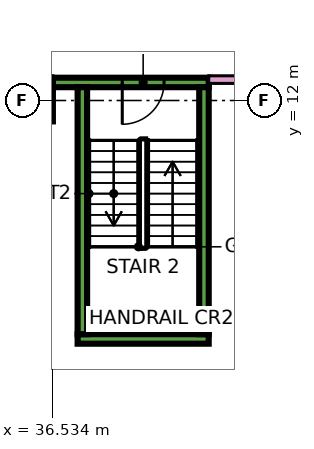
"""IFC4 building model, lengths in metres.
Left out: names, types, materials, properties, quantities, classifications, styles, units other than length and angle.
Written with IfcOpenShell. Run it as: python <this file> out.ifc"""

import sys

from ifc_helpers import new_model, si_unit, direction, frame, frame_2d, origin, origin_2d, place, context, subcontext, project, spatial, rectangle, extrude, element, fill, save


model = new_model("IFC4")
c1 = context("Model", 3, precision=1e-05, world=origin(), true_north=direction((0.0, 1.0)))
c2 = subcontext(c1, "Body", "Model", "MODEL_VIEW")
j1 = project(units=[si_unit("LENGTHUNIT", "METRE"), si_unit("PLANEANGLEUNIT", "RADIAN")], contexts=[c1])
p1 = place(None, origin())
s1 = spatial("IfcSite", under=j1, at=p1, CompositionType="ELEMENT")
p2 = place(p1, origin())
s2 = spatial("IfcBuilding", under=s1, at=p2, CompositionType="ELEMENT")
p3 = place(p2, frame((0.0, 0.0, 52.65)))
s3 = spatial("IfcBuildingStorey", under=s2, at=p3, CompositionType="ELEMENT", Elevation=52.65)
p4 = place(p3, frame((36.0, 12.0, 0.0), z_axis=(0.0, 0.0, 1.0), x_axis=(1.0, 0.0, 0.0)))
e1 = element("IfcColumn", 1, at=p4, inside=s3, PredefinedType="COLUMN", context=c2, shape_type="SweptSolid", body=[
    extrude(rectangle(XDim=1.1, YDim=1.1, at=origin_2d()), origin(), (0.0, 0.0, 1.0), 3.75),
])
p5 = place(p3, frame((37.2, 5.725, 0.0), z_axis=(0.0, 0.0, 1.0), x_axis=(1.0, 0.0, 0.0)))
e2 = element("IfcWall", 2, at=p5, inside=s3, PredefinedType="SHEAR", context=c2, shape_type="SweptSolid", body=[
    extrude(rectangle(XDim=3.45, YDim=0.25, at=frame_2d((1.725, 0.0))), origin(), (0.0, 0.0, 1.0), 3.75),
])
p6 = place(p3, frame((36.55, 12.475, 0.0), z_axis=(0.0, 0.0, 1.0), x_axis=(1.0, 0.0, 0.0)))
e3 = element("IfcWall", 3, at=p6, inside=s3, PredefinedType="SHEAR", context=c2, shape_type="SweptSolid", body=[
    extrude(rectangle(XDim=4.1, YDim=0.25, at=frame_2d((2.05, 0.0))), origin(), (0.0, 0.0, 1.0), 3.75),
])
p7 = place(p6, frame((1.825, 0.0, 0.0)))
e4 = element("IfcOpeningElement", 4, at=p7, cuts=e3, PredefinedType="OPENING", context=c2, shape_type="SweptSolid", body=[
    extrude(rectangle(XDim=1.1, YDim=2.2, at=frame_2d((0.55, 1.1))), frame((0.0, 0.135, 0.0), z_axis=(0.0, -1.0, 0.0), x_axis=(1.0, 0.0, 0.0)), (0.0, 0.0, 1.0), 0.27),
])
for number, where, z_axis, x_axis in (
    (5, (37.325, 5.85, 0.0), (0.0, 0.0, 1.0), (0.0, 1.0, 0.0)),
    (6, (40.525, 5.85, 0.0), (0.0, 0.0, 1.0), (0.0, 1.0, 0.0)),
):
    element("IfcWall", number, at=place(p3, frame(where, z_axis=z_axis, x_axis=x_axis)), inside=s3, PredefinedType="SHEAR", context=c2, shape_type="SweptSolid", body=[
        extrude(rectangle(XDim=6.5, YDim=0.25, at=frame_2d((3.25, 0.0))), origin(), (0.0, 0.0, 1.0), 3.75),
    ])
p8 = place(p3, frame((34.0, 12.55, 0.0), z_axis=(0.0, 0.0, 1.0), x_axis=(1.0, 0.0, 0.0)))
e7 = element("IfcWall", 7, at=p8, inside=s3, PredefinedType="PARTITIONING", context=c2, shape_type="SweptSolid", body=[
    extrude(rectangle(XDim=2.551, YDim=0.2, at=frame_2d((1.275, 0.0))), origin(), (0.0, 0.0, 1.0), 3.35),
])
p9 = place(p3, frame((40.65, 12.55, 0.0), z_axis=(0.0, 0.0, 1.0), x_axis=(1.0, 0.0, 0.0)))
e8 = element("IfcWall", 8, at=p9, inside=s3, PredefinedType="PARTITIONING", context=c2, shape_type="SweptSolid", body=[
    extrude(rectangle(XDim=31.35, YDim=0.2, at=frame_2d((15.675, 0.0))), origin(), (0.0, 0.0, 1.0), 3.35),
])
p10 = place(p9, frame((24.0, 0.0, 0.0)))
e9 = element("IfcOpeningElement", 9, at=p10, cuts=e8, PredefinedType="OPENING", context=c2, shape_type="SweptSolid", body=[
    extrude(rectangle(XDim=1.0, YDim=2.1, at=frame_2d((0.5, 1.05))), frame((0.0, 0.11, 0.0), z_axis=(0.0, -1.0, 0.0), x_axis=(1.0, 0.0, 0.0)), (0.0, 0.0, 1.0), 0.22),
])
p11 = place(p9, frame((1.05, 0.0, 0.0)))
e10 = element("IfcOpeningElement", 10, at=p11, cuts=e8, PredefinedType="OPENING", context=c2, shape_type="SweptSolid", body=[
    extrude(rectangle(XDim=1.0, YDim=2.1, at=frame_2d((0.5, 1.05))), frame((0.0, 0.11, 0.0), z_axis=(0.0, -1.0, 0.0), x_axis=(1.0, 0.0, 0.0)), (0.0, 0.0, 1.0), 0.22),
])
p12 = place(p7, frame((1.1, 0.0, 0.0), z_axis=(0.0, 0.0, 1.0), x_axis=(-1.0, 0.0, 0.0)))
e11 = element("IfcDoor", 11, at=p12, inside=s3, OperationType="SINGLE_SWING_LEFT", PredefinedType="DOOR", context=c2, shape_type="SweptSolid", body=[
    extrude(rectangle(XDim=1.1, YDim=2.2, at=frame_2d((0.55, 1.1))), frame((0.0, 0.025, 0.0), z_axis=(0.0, -1.0, 0.0), x_axis=(1.0, 0.0, 0.0)), (0.0, 0.0, 1.0), 0.05),
])
fill(e4, e11)
save(model, sys.argv[1])
